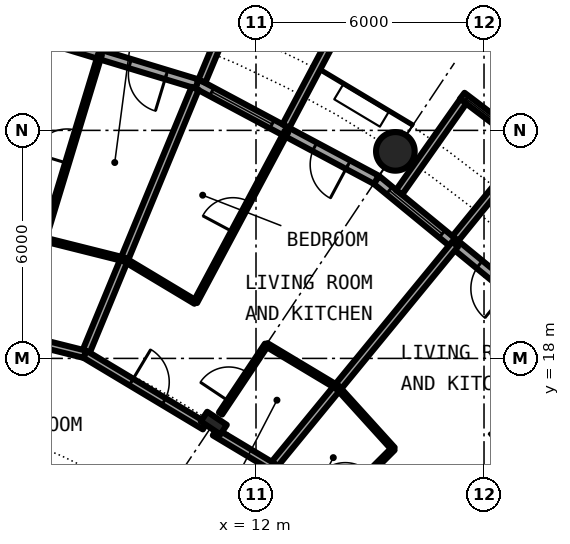
"""IFC4 building model, lengths in metres.
Left out: names, types, materials, properties, quantities, classifications, styles, units other than length and angle.
Written with IfcOpenShell. Run it as: python <this file> out.ifc"""

import sys

from ifc_helpers import new_model, si_unit, direction, frame, frame_2d, origin, origin_2d, place, context, subcontext, project, spatial, rectangle, circle, hollow_circle, i_section, extrude, element, fill, save


model = new_model("IFC4")
c1 = context("Model", 3, precision=1e-05, world=origin(), true_north=direction((0.0, 1.0)))
c2 = subcontext(c1, "Body", "Model", "MODEL_VIEW")
j1 = project(units=[si_unit("LENGTHUNIT", "METRE"), si_unit("PLANEANGLEUNIT", "RADIAN")], contexts=[c1])
p1 = place(None, origin())
s1 = spatial("IfcSite", under=j1, at=p1, CompositionType="ELEMENT")
p2 = place(p1, origin())
s2 = spatial("IfcBuilding", under=s1, at=p2, CompositionType="ELEMENT")
p3 = place(p2, frame((0.0, 0.0, 31.95)))
s3 = spatial("IfcBuildingStorey", under=s2, at=p3, CompositionType="ELEMENT", Elevation=31.95)
p4 = place(p3, frame((15.667, 23.448, 0.0), z_axis=(0.0, 0.0, 1.0), x_axis=(1.0, 0.0, 0.0)))
e1 = element("IfcColumn", 1, at=p4, inside=s3, PredefinedType="COLUMN", context=c2, shape_type="SweptSolid", body=[
    extrude(hollow_circle(Radius=0.508, WallThickness=0.05, at=origin_2d()), origin(), (0.0, 0.0, 1.0), 3.05),
])
p5 = place(p3, frame((10.889, 16.297, 0.0), z_axis=(0.0, 0.0, 1.0), x_axis=(0.55557023302, 0.831469612303, 0.0)))
e2 = element("IfcColumn", 2, at=p5, inside=s3, PredefinedType="COLUMN", context=c2, shape_type="SweptSolid", body=[
    extrude(i_section(OverallWidth=0.305, OverallDepth=0.62, WebThickness=0.021, FlangeThickness=0.04, FilletRadius=0.027, at=origin_2d()), origin(), (0.0, 0.0, 1.0), 3.05),
])
p6 = place(p3, frame((19.304, 19.304, 0.0), z_axis=(0.0, 0.0, 1.0), x_axis=(-0.773019449054, 0.634382322723, 0.0)))
e3 = element("IfcWall", 3, at=p6, inside=s3, PredefinedType="SOLIDWALL", context=c2, shape_type="SweptSolid", body=[
    extrude(rectangle(XDim=5.352, YDim=0.25, at=frame_2d((2.676, 0.0))), origin(), (0.0, 0.0, 1.0), 2.7),
])
p7 = place(p6, frame((0.841, 0.0, 0.0)))
e4 = element("IfcOpeningElement", 4, at=p7, cuts=e3, PredefinedType="OPENING", context=c2, shape_type="SweptSolid", body=[
    extrude(rectangle(XDim=1.0, YDim=2.2, at=frame_2d((0.5, 1.1))), frame((0.0, 0.135, 0.0), z_axis=(0.0, -1.0, 0.0), x_axis=(1.0, 0.0, 0.0)), (0.0, 0.0, 1.0), 0.27),
])
p8 = place(p6, frame((3.111, 0.0, 0.3)))
e5 = element("IfcOpeningElement", 5, at=p8, cuts=e3, PredefinedType="OPENING", context=c2, shape_type="SweptSolid", body=[
    extrude(rectangle(XDim=1.8, YDim=2.1, at=frame_2d((0.9, 1.05))), frame((0.0, 0.135, 0.0), z_axis=(0.0, -1.0, 0.0), x_axis=(1.0, 0.0, 0.0)), (0.0, 0.0, 1.0), 0.27),
])
p9 = place(p3, frame((19.289, 23.497, -0.03), z_axis=(0.0, 0.0, 1.0), x_axis=(-0.796842165306, 0.60418752353, 0.0)))
e6 = element("IfcWall", 6, at=p9, inside=s3, PredefinedType="SOLIDWALL", context=c2, shape_type="SweptSolid", body=[
    extrude(rectangle(XDim=2.337, YDim=0.2, at=frame_2d((1.168, 0.0))), origin(), (0.0, 0.0, 1.0), 2.73),
])
p10 = place(p9, frame((0.128, 0.0, 0.33)))
e7 = element("IfcOpeningElement", 7, at=p10, cuts=e6, PredefinedType="OPENING", context=c2, shape_type="SweptSolid", body=[
    extrude(circle(Radius=1.04, at=frame_2d((1.04, 1.04))), frame((0.0, 0.11, 0.0), z_axis=(0.0, -1.0, 0.0), x_axis=(1.0, 0.0, 0.0)), (0.0, 0.0, 1.0), 0.22),
])
p11 = place(p3, frame((17.246, 21.155, -0.03), z_axis=(0.0, 0.0, 1.0), x_axis=(0.631741648902, 0.775179004516, 0.0)))
e8 = element("IfcWall", 8, at=p11, inside=s3, PredefinedType="SOLIDWALL", context=c2, shape_type="SweptSolid", body=[
    extrude(rectangle(XDim=3.006, YDim=0.2, at=frame_2d((1.503, 0.0))), origin(), (0.0, 0.0, 1.0), 2.73),
])
p12 = place(p3, frame((15.765, 22.37, -0.03), z_axis=(0.0, 0.0, 1.0), x_axis=(0.576274612209, 0.817256123454, 0.0)))
e9 = element("IfcWall", 9, at=p12, inside=s3, PredefinedType="SOLIDWALL", context=c2, shape_type="SweptSolid", body=[
    extrude(rectangle(XDim=2.933, YDim=0.2, at=frame_2d((1.466, 0.0))), origin(), (0.0, 0.0, 1.0), 2.73),
])
p13 = place(p3, frame((15.167, 22.699, 0.0), z_axis=(0.0, 0.0, 1.0), x_axis=(-0.881915646801, 0.471407246368, 0.0)))
e10 = element("IfcWall", 10, at=p13, inside=s3, PredefinedType="SOLIDWALL", context=c2, shape_type="SweptSolid", body=[
    extrude(rectangle(XDim=5.352, YDim=0.25, at=frame_2d((2.676, 0.0))), origin(), (0.0, 0.0, 1.0), 2.7),
])
p14 = place(p13, frame((0.841, 0.0, 0.0)))
e11 = element("IfcOpeningElement", 11, at=p14, cuts=e10, PredefinedType="OPENING", context=c2, shape_type="SweptSolid", body=[
    extrude(rectangle(XDim=1.0, YDim=2.2, at=frame_2d((0.5, 1.1))), frame((0.0, 0.135, 0.0), z_axis=(0.0, -1.0, 0.0), x_axis=(1.0, 0.0, 0.0)), (0.0, 0.0, 1.0), 0.27),
])
p15 = place(p13, frame((3.111, 0.0, 0.3)))
e12 = element("IfcOpeningElement", 12, at=p15, cuts=e10, PredefinedType="OPENING", context=c2, shape_type="SweptSolid", body=[
    extrude(rectangle(XDim=1.8, YDim=2.1, at=frame_2d((0.9, 1.05))), frame((0.0, 0.135, 0.0), z_axis=(0.0, -1.0, 0.0), x_axis=(1.0, 0.0, 0.0)), (0.0, 0.0, 1.0), 0.27),
])
p16 = place(p3, frame((12.787, 24.113, -0.03), z_axis=(0.0, 0.0, 1.0), x_axis=(0.468365282436, 0.883534924159, 0.0)))
e13 = element("IfcWall", 13, at=p16, inside=s3, PredefinedType="SOLIDWALL", context=c2, shape_type="SweptSolid", body=[
    extrude(rectangle(XDim=3.006, YDim=0.2, at=frame_2d((1.503, 0.0))), origin(), (0.0, 0.0, 1.0), 2.73),
])
p17 = place(p3, frame((10.575, 25.295, -0.03), z_axis=(0.0, 0.0, 1.0), x_axis=(0.385697364644, 0.922625353492, 0.0)))
e14 = element("IfcWall", 14, at=p17, inside=s3, PredefinedType="SOLIDWALL", context=c2, shape_type="SweptSolid", body=[
    extrude(rectangle(XDim=2.883, YDim=0.2, at=frame_2d((1.442, 0.0))), origin(), (0.0, 0.0, 1.0), 2.73),
])
p18 = place(p3, frame((10.447, 25.222, 0.0), z_axis=(0.0, 0.0, 1.0), x_axis=(-0.956965678721, 0.290201119486, 0.0)))
e15 = element("IfcWall", 15, at=p18, inside=s3, PredefinedType="SOLIDWALL", context=c2, shape_type="SweptSolid", body=[
    extrude(rectangle(XDim=5.351, YDim=0.25, at=frame_2d((2.676, 0.0))), origin(), (0.0, 0.0, 1.0), 2.7),
])
p19 = place(p18, frame((0.841, 0.0, 0.0)))
e16 = element("IfcOpeningElement", 16, at=p19, cuts=e15, PredefinedType="OPENING", context=c2, shape_type="SweptSolid", body=[
    extrude(rectangle(XDim=1.0, YDim=2.2, at=frame_2d((0.5, 1.1))), frame((0.0, 0.135, 0.0), z_axis=(0.0, -1.0, 0.0), x_axis=(1.0, 0.0, 0.0)), (0.0, 0.0, 1.0), 0.27),
])
p20 = place(p18, frame((3.111, 0.0, 0.3)))
e17 = element("IfcOpeningElement", 17, at=p20, cuts=e15, PredefinedType="OPENING", context=c2, shape_type="SweptSolid", body=[
    extrude(rectangle(XDim=1.8, YDim=2.1, at=frame_2d((0.9, 1.05))), frame((0.0, 0.135, 0.0), z_axis=(0.0, -1.0, 0.0), x_axis=(1.0, 0.0, 0.0)), (0.0, 0.0, 1.0), 0.27),
])
p21 = place(p3, frame((6.418, 21.133, 0.0), z_axis=(0.0, 0.0, 1.0), x_axis=(0.290651827018, 0.956828885147, 0.0)))
e18 = element("IfcWall", 18, at=p21, inside=s3, PredefinedType="PARTITIONING", context=c2, shape_type="SweptSolid", body=[
    extrude(rectangle(XDim=5.089, YDim=0.1, at=frame_2d((2.544, 0.0))), origin(), (0.0, 0.0, 1.0), 2.7),
])
p22 = place(p21, frame((2.094, 0.0, 0.0)))
e19 = element("IfcOpeningElement", 19, at=p22, cuts=e18, PredefinedType="OPENING", context=c2, shape_type="SweptSolid", body=[
    extrude(rectangle(XDim=0.9, YDim=2.3, at=frame_2d((0.45, 1.15))), frame((0.0, 0.06, 0.0), z_axis=(0.0, -1.0, 0.0), x_axis=(1.0, 0.0, 0.0)), (0.0, 0.0, 1.0), 0.12),
])
p23 = place(p3, frame((7.501, 18.108, 0.0), z_axis=(0.0, 0.0, 1.0), x_axis=(0.382490346157, 0.923959487801, 0.0)))
e20 = element("IfcWall", 20, at=p23, inside=s3, PredefinedType="PARTITIONING", context=c2, shape_type="SweptSolid", body=[
    extrude(rectangle(XDim=7.574, YDim=0.2, at=frame_2d((3.787, 0.0))), origin(), (0.0, 0.0, 1.0), 2.7),
])
p24 = place(p3, frame((10.405, 19.481, 0.0), z_axis=(0.0, 0.0, 1.0), x_axis=(0.471170755767, 0.882042016522, 0.0)))
e21 = element("IfcWall", 21, at=p24, inside=s3, PredefinedType="PARTITIONING", context=c2, shape_type="SweptSolid", body=[
    extrude(rectangle(XDim=5.089, YDim=0.1, at=frame_2d((2.545, 0.0))), origin(), (0.0, 0.0, 1.0), 2.7),
])
p25 = place(p24, frame((2.095, 0.0, 0.0)))
e22 = element("IfcOpeningElement", 22, at=p25, cuts=e21, PredefinedType="OPENING", context=c2, shape_type="SweptSolid", body=[
    extrude(rectangle(XDim=0.9, YDim=2.3, at=frame_2d((0.45, 1.15))), frame((0.0, 0.06, 0.0), z_axis=(0.0, -1.0, 0.0), x_axis=(1.0, 0.0, 0.0)), (0.0, 0.0, 1.0), 0.12),
])
p26 = place(p3, frame((11.067, 16.551, 0.0), z_axis=(0.0, 0.0, 1.0), x_axis=(0.55563200073, 0.831428337119, 0.0)))
e23 = element("IfcWall", 23, at=p26, inside=s3, PredefinedType="PARTITIONING", context=c2, shape_type="SweptSolid", body=[
    extrude(rectangle(XDim=2.176, YDim=0.1, at=frame_2d((1.088, 0.0))), origin(), (0.0, 0.0, 1.0), 2.7),
])
p27 = place(p26, frame((0.389, 0.0, 0.0)))
e24 = element("IfcOpeningElement", 24, at=p27, cuts=e23, PredefinedType="OPENING", context=c2, shape_type="SweptSolid", body=[
    extrude(rectangle(XDim=0.9, YDim=2.3, at=frame_2d((0.45, 1.15))), frame((0.0, 0.06, 0.0), z_axis=(0.0, -1.0, 0.0), x_axis=(1.0, 0.0, 0.0)), (0.0, 0.0, 1.0), 0.12),
])
p28 = place(p3, frame((12.434, 15.151, 0.0), z_axis=(0.0, 0.0, 1.0), x_axis=(0.634381303318, 0.773020285633, 0.0)))
e25 = element("IfcWall", 25, at=p28, inside=s3, PredefinedType="PARTITIONING", context=c2, shape_type="SweptSolid", body=[
    extrude(rectangle(XDim=7.576, YDim=0.2, at=frame_2d((3.788, 0.0))), origin(), (0.0, 0.0, 1.0), 2.7),
])
p29 = place(p3, frame((13.722, 13.73, 0.0), z_axis=(0.0, 0.0, 1.0), x_axis=(0.706741540154, 0.707471833659, 0.0)))
e26 = element("IfcWall", 26, at=p29, inside=s3, PredefinedType="PARTITIONING", context=c2, shape_type="SweptSolid", body=[
    extrude(rectangle(XDim=2.674, YDim=0.1, at=frame_2d((1.337, 0.0))), origin(), (0.0, 0.0, 1.0), 2.7),
])
p30 = place(p29, frame((0.887, 0.0, 0.0)))
e27 = element("IfcOpeningElement", 27, at=p30, cuts=e26, PredefinedType="OPENING", context=c2, shape_type="SweptSolid", body=[
    extrude(rectangle(XDim=0.9, YDim=2.3, at=frame_2d((0.45, 1.15))), frame((0.0, 0.06, 0.0), z_axis=(0.0, -1.0, 0.0), x_axis=(1.0, 0.0, 0.0)), (0.0, 0.0, 1.0), 0.12),
])
p31 = place(p3, frame((17.077, 14.006, 0.0), z_axis=(0.0, 0.0, 1.0), x_axis=(0.77326214499, 0.634086472908, 0.0)))
e28 = element("IfcWall", 28, at=p31, inside=s3, PredefinedType="PARTITIONING", context=c2, shape_type="SweptSolid", body=[
    extrude(rectangle(XDim=5.089, YDim=0.1, at=frame_2d((2.544, 0.0))), origin(), (0.0, 0.0, 1.0), 2.7),
])
p32 = place(p31, frame((2.094, 0.0, 0.0)))
e29 = element("IfcOpeningElement", 29, at=p32, cuts=e28, PredefinedType="OPENING", context=c2, shape_type="SweptSolid", body=[
    extrude(rectangle(XDim=0.9, YDim=2.3, at=frame_2d((0.45, 1.15))), frame((0.0, 0.06, 0.0), z_axis=(0.0, -1.0, 0.0), x_axis=(1.0, 0.0, 0.0)), (0.0, 0.0, 1.0), 0.12),
])
p33 = place(p3, frame((3.299, 16.574, 0.0), z_axis=(0.0, 0.0, 1.0), x_axis=(0.831465254975, -0.555576754166, 0.0)))
e30 = element("IfcWall", 30, at=p33, inside=s3, PredefinedType="PARTITIONING", context=c2, shape_type="SweptSolid", body=[
    extrude(rectangle(XDim=12.915, YDim=0.2, at=frame_2d((6.457, 0.0))), origin(), (0.0, 0.0, 1.0), 2.7),
])
p34 = place(p33, frame((4.346, 0.0, 0.0)))
e31 = element("IfcOpeningElement", 31, at=p34, cuts=e30, PredefinedType="OPENING", context=c2, shape_type="SweptSolid", body=[
    extrude(rectangle(XDim=1.0, YDim=2.3, at=frame_2d((0.5, 1.15))), frame((0.0, 0.11, 0.0), z_axis=(0.0, -1.0, 0.0), x_axis=(1.0, 0.0, 0.0)), (0.0, 0.0, 1.0), 0.22),
])
p35 = place(p3, frame((3.935, 19.001, 0.0), z_axis=(0.0, 0.0, 1.0), x_axis=(0.970040840928, -0.242941900323, 0.0)))
e32 = element("IfcWall", 32, at=p35, inside=s3, PredefinedType="PARTITIONING", context=c2, shape_type="SweptSolid", body=[
    extrude(rectangle(XDim=3.676, YDim=0.2, at=frame_2d((1.838, 0.0))), origin(), (0.0, 0.0, 1.0), 2.38),
])
p36 = place(p35, frame((1.259, 0.0, 0.0)))
e33 = element("IfcOpeningElement", 33, at=p36, cuts=e32, PredefinedType="OPENING", context=c2, shape_type="SweptSolid", body=[
    extrude(rectangle(XDim=1.0, YDim=2.3, at=frame_2d((0.5, 1.15))), frame((0.0, 0.11, 0.0), z_axis=(0.0, -1.0, 0.0), x_axis=(1.0, 0.0, 0.0)), (0.0, 0.0, 1.0), 0.22),
])
p37 = place(p3, frame((7.501, 18.108, 0.0), z_axis=(0.0, 0.0, 1.0), x_axis=(0.857656999296, -0.514222200569, 0.0)))
e34 = element("IfcWall", 34, at=p37, inside=s3, PredefinedType="PARTITIONING", context=c2, shape_type="SweptSolid", body=[
    extrude(rectangle(XDim=3.675, YDim=0.2, at=frame_2d((1.838, 0.0))), origin(), (0.0, 0.0, 1.0), 2.38),
])
p38 = place(p37, frame((1.418, 0.0, 0.0)))
e35 = element("IfcOpeningElement", 35, at=p38, cuts=e34, PredefinedType="OPENING", context=c2, shape_type="SweptSolid", body=[
    extrude(rectangle(XDim=1.0, YDim=2.3, at=frame_2d((0.5, 1.15))), frame((0.0, 0.11, 0.0), z_axis=(0.0, -1.0, 0.0), x_axis=(1.0, 0.0, 0.0)), (0.0, 0.0, 1.0), 0.22),
])
p39 = place(p3, frame((10.915, 16.061, 0.0), z_axis=(0.0, 0.0, 1.0), x_axis=(0.857809047014, -0.513968519329, 0.0)))
e36 = element("IfcWall", 36, at=p39, inside=s3, PredefinedType="PARTITIONING", context=c2, shape_type="SweptSolid", body=[
    extrude(rectangle(XDim=1.771, YDim=0.2, at=frame_2d((0.885, 0.0))), origin(), (0.0, 0.0, 1.0), 2.38),
])
p40 = place(p3, frame((6.418, 21.133, 0.0), z_axis=(0.0, 0.0, 1.0), x_axis=(0.97003047456, -0.242983288366, 0.0)))
e37 = element("IfcWall", 37, at=p40, inside=s3, PredefinedType="PARTITIONING", context=c2, shape_type="SweptSolid", body=[
    extrude(rectangle(XDim=2.181, YDim=0.1, at=frame_2d((1.091, 0.0))), origin(), (0.0, 0.0, 1.0), 2.7),
])
for number, where, z_axis, x_axis in (
    (38, (8.534, 20.603, 0.0), (0.0, 0.0, 1.0), (0.858, -0.514, 0.0)),
    (39, (12.276, 18.359, 0.0), (0.0, 0.0, 1.0), (0.858, -0.514, 0.0)),
):
    element("IfcWall", number, at=place(p3, frame(where, z_axis=z_axis, x_axis=x_axis)), inside=s3, PredefinedType="PARTITIONING", context=c2, shape_type="SweptSolid", body=[
        extrude(rectangle(XDim=2.182, YDim=0.1, at=frame_2d((1.091, 0.0))), origin(), (0.0, 0.0, 1.0), 2.7),
    ])
p41 = place(p3, frame((14.147, 17.238, 0.0), z_axis=(0.0, 0.0, 1.0), x_axis=(0.671674967707, -0.740845960882, 0.0)))
e40 = element("IfcWall", 40, at=p41, inside=s3, PredefinedType="PARTITIONING", context=c2, shape_type="SweptSolid", body=[
    extrude(rectangle(XDim=2.181, YDim=0.1, at=frame_2d((1.091, 0.0))), origin(), (0.0, 0.0, 1.0), 2.7),
])
p42 = place(p7, origin())
e41 = element("IfcDoor", 41, at=p42, inside=s3, OperationType="SINGLE_SWING_LEFT", PredefinedType="DOOR", context=c2, shape_type="SweptSolid", body=[
    extrude(rectangle(XDim=1.0, YDim=2.2, at=frame_2d((0.5, 1.1))), frame((0.0, 0.025, 0.0), z_axis=(0.0, -1.0, 0.0), x_axis=(1.0, 0.0, 0.0)), (0.0, 0.0, 1.0), 0.05),
])
fill(e4, e41)
p43 = place(p8, origin())
e42 = element("IfcWindow", 42, at=p43, inside=s3, PartitioningType="SINGLE_PANEL", PredefinedType="WINDOW", context=c2, shape_type="SweptSolid", body=[
    extrude(rectangle(XDim=1.8, YDim=2.1, at=frame_2d((0.9, 1.05))), frame((0.0, 0.03, 0.0), z_axis=(0.0, -1.0, 0.0), x_axis=(1.0, 0.0, 0.0)), (0.0, 0.0, 1.0), 0.06),
])
fill(e5, e42)
p44 = place(p10, origin())
e43 = element("IfcWindow", 43, at=p44, inside=s3, PartitioningType="SINGLE_PANEL", PredefinedType="WINDOW", context=c2, shape_type="SweptSolid", body=[
    extrude(circle(Radius=1.04, at=frame_2d((1.04, 1.04))), frame((0.0, 0.03, 0.0), z_axis=(0.0, -1.0, 0.0), x_axis=(1.0, 0.0, 0.0)), (0.0, 0.0, 1.0), 0.06),
])
fill(e7, e43)
p45 = place(p14, origin())
e44 = element("IfcDoor", 44, at=p45, inside=s3, OperationType="SINGLE_SWING_LEFT", PredefinedType="DOOR", context=c2, shape_type="SweptSolid", body=[
    extrude(rectangle(XDim=1.0, YDim=2.2, at=frame_2d((0.5, 1.1))), frame((0.0, 0.025, 0.0), z_axis=(0.0, -1.0, 0.0), x_axis=(1.0, 0.0, 0.0)), (0.0, 0.0, 1.0), 0.05),
])
fill(e11, e44)
p46 = place(p15, origin())
e45 = element("IfcWindow", 45, at=p46, inside=s3, PartitioningType="SINGLE_PANEL", PredefinedType="WINDOW", context=c2, shape_type="SweptSolid", body=[
    extrude(rectangle(XDim=1.8, YDim=2.1, at=frame_2d((0.9, 1.05))), frame((0.0, 0.03, 0.0), z_axis=(0.0, -1.0, 0.0), x_axis=(1.0, 0.0, 0.0)), (0.0, 0.0, 1.0), 0.06),
])
fill(e12, e45)
p47 = place(p19, origin())
e46 = element("IfcDoor", 46, at=p47, inside=s3, OperationType="SINGLE_SWING_LEFT", PredefinedType="DOOR", context=c2, shape_type="SweptSolid", body=[
    extrude(rectangle(XDim=1.0, YDim=2.2, at=frame_2d((0.5, 1.1))), frame((0.0, 0.025, 0.0), z_axis=(0.0, -1.0, 0.0), x_axis=(1.0, 0.0, 0.0)), (0.0, 0.0, 1.0), 0.05),
])
fill(e16, e46)
p48 = place(p38, origin())
e47 = element("IfcDoor", 47, at=p48, inside=s3, OperationType="SINGLE_SWING_RIGHT", PredefinedType="DOOR", context=c2, shape_type="SweptSolid", body=[
    extrude(rectangle(XDim=1.0, YDim=2.3, at=frame_2d((0.5, 1.15))), frame((0.0, 0.025, 0.0), z_axis=(0.0, -1.0, 0.0), x_axis=(1.0, 0.0, 0.0)), (0.0, 0.0, 1.0), 0.05),
])
fill(e35, e47)
p49 = place(p27, origin())
e48 = element("IfcDoor", 48, at=p49, inside=s3, OperationType="SINGLE_SWING_LEFT", PredefinedType="DOOR", context=c2, shape_type="SweptSolid", body=[
    extrude(rectangle(XDim=0.9, YDim=2.3, at=frame_2d((0.45, 1.15))), frame((0.0, 0.025, 0.0), z_axis=(0.0, -1.0, 0.0), x_axis=(1.0, 0.0, 0.0)), (0.0, 0.0, 1.0), 0.05),
])
fill(e24, e48)
p50 = place(p25, origin())
e49 = element("IfcDoor", 49, at=p50, inside=s3, OperationType="SINGLE_SWING_RIGHT", PredefinedType="DOOR", context=c2, shape_type="SweptSolid", body=[
    extrude(rectangle(XDim=0.9, YDim=2.3, at=frame_2d((0.45, 1.15))), frame((0.0, 0.025, 0.0), z_axis=(0.0, -1.0, 0.0), x_axis=(1.0, 0.0, 0.0)), (0.0, 0.0, 1.0), 0.05),
])
fill(e22, e49)
p51 = place(p22, origin())
e50 = element("IfcDoor", 50, at=p51, inside=s3, OperationType="SINGLE_SWING_LEFT", PredefinedType="DOOR", context=c2, shape_type="SweptSolid", body=[
    extrude(rectangle(XDim=0.9, YDim=2.3, at=frame_2d((0.45, 1.15))), frame((0.0, 0.025, 0.0), z_axis=(0.0, -1.0, 0.0), x_axis=(1.0, 0.0, 0.0)), (0.0, 0.0, 1.0), 0.05),
])
fill(e19, e50)
save(model, sys.argv[1])
